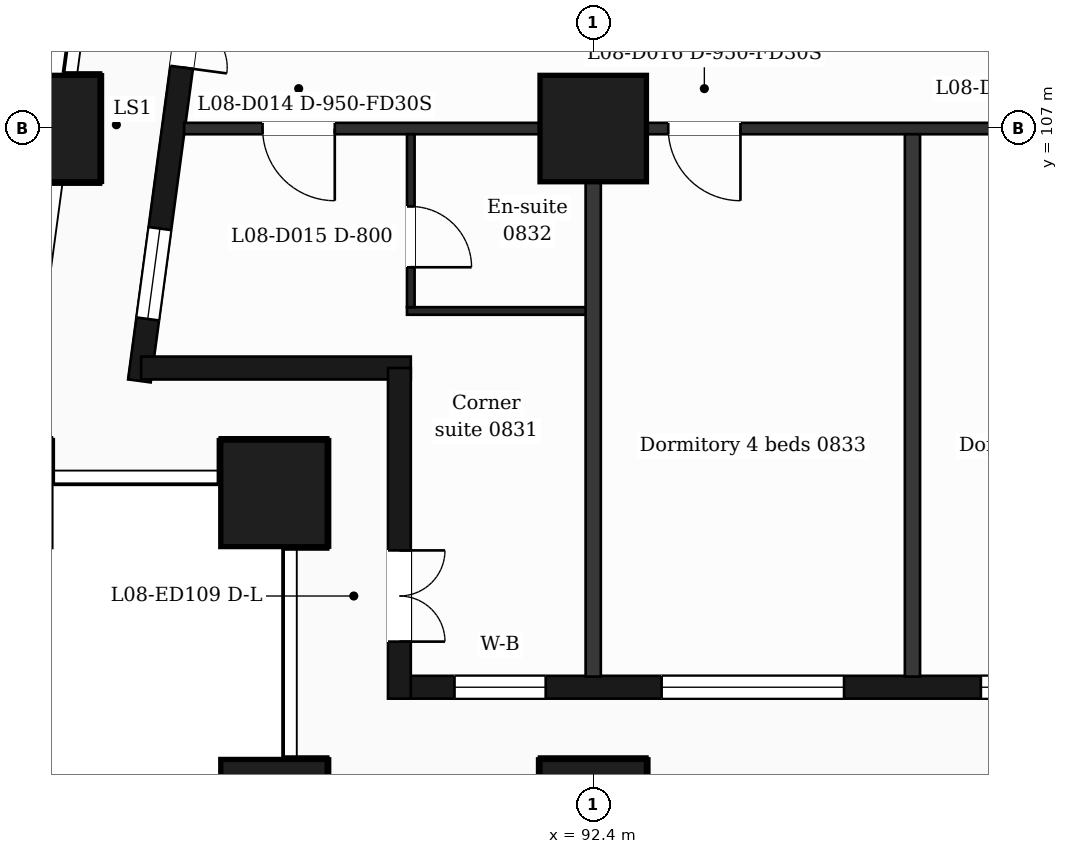
"""IFC4 building model, lengths in metres.
Left out: names, types, materials, properties, quantities, classifications, styles, units other than length and angle.
Written with IfcOpenShell. Run it as: python <this file> out.ifc"""

import sys

from ifc_helpers import new_model, si_unit, direction, frame, frame_2d, origin, origin_2d, place, context, subcontext, project, spatial, rectangle, extrude, element, fill, save


model = new_model("IFC4")
c1 = context("Model", 3, precision=1e-05, world=origin(), true_north=direction((0.0, 1.0)))
c2 = subcontext(c1, "Body", "Model", "MODEL_VIEW")
j1 = project(units=[si_unit("LENGTHUNIT", "METRE"), si_unit("PLANEANGLEUNIT", "RADIAN")], contexts=[c1])
p1 = place(None, origin())
s1 = spatial("IfcSite", under=j1, at=p1, CompositionType="ELEMENT")
p2 = place(p1, origin())
s2 = spatial("IfcBuilding", under=s1, at=p2, CompositionType="ELEMENT")
p3 = place(p2, frame((0.0, 0.0, 46.0)))
s3 = spatial("IfcBuildingStorey", under=s2, at=p3, CompositionType="ELEMENT", Elevation=46.0)
for number, where, z_axis, x_axis in (
    (1, (92.4, 98.0, 0.0), (0.0, 0.0, 1.0), (1.0, 0.0, 0.0)),
    (2, (88.2, 98.0, 0.0), (0.0, 0.0, 1.0), (1.0, 0.0, 0.0)),
    (3, (88.2, 102.2, 0.0), (0.0, 0.0, 1.0), (1.0, 0.0, 0.0)),
    (4, (92.4, 107.0, 0.0), (0.0, 0.0, 1.0), (1.0, 0.0, 0.0)),
    (5, (85.211, 107.0, 0.0), (0.0, 0.0, 1.0), (1.0, 0.0, 0.0)),
):
    element("IfcColumn", number, at=place(p3, frame(where, z_axis=z_axis, x_axis=x_axis)), inside=s3, PredefinedType="COLUMN", context=c2, shape_type="SweptSolid", body=[
        extrude(rectangle(XDim=1.4, YDim=1.4, at=origin_2d()), origin(), (0.0, 0.0, 1.0), 3.5),
    ])
p4 = place(p3, frame((89.85, 99.65, 0.0), z_axis=(0.0, 0.0, 1.0), x_axis=(1.0, 0.0, 0.0)))
e6 = element("IfcWall", 6, at=p4, inside=s3, PredefinedType="SOLIDWALL", context=c2, shape_type="SweptSolid", body=[
    extrude(rectangle(XDim=47.25, YDim=0.3, at=frame_2d((23.625, 0.0))), origin(), (0.0, 0.0, 1.0), 3.18),
])
p5 = place(p4, frame((0.725, 0.0, 0.9)))
e7 = element("IfcOpeningElement", 7, at=p5, cuts=e6, PredefinedType="OPENING", context=c2, shape_type="SweptSolid", body=[
    extrude(rectangle(XDim=1.2, YDim=2.1, at=frame_2d((0.6, 1.05))), frame((0.0, 0.16, 0.0), z_axis=(0.0, -1.0, 0.0), x_axis=(1.0, 0.0, 0.0)), (0.0, 0.0, 1.0), 0.32),
])
p6 = place(p4, frame((3.45, 0.0, 0.9)))
e8 = element("IfcOpeningElement", 8, at=p6, cuts=e6, PredefinedType="OPENING", context=c2, shape_type="SweptSolid", body=[
    extrude(rectangle(XDim=2.4, YDim=2.1, at=frame_2d((1.2, 1.05))), frame((0.0, 0.16, 0.0), z_axis=(0.0, -1.0, 0.0), x_axis=(1.0, 0.0, 0.0)), (0.0, 0.0, 1.0), 0.32),
])
p7 = place(p4, frame((7.65, 0.0, 0.9)))
e9 = element("IfcOpeningElement", 9, at=p7, cuts=e6, PredefinedType="OPENING", context=c2, shape_type="SweptSolid", body=[
    extrude(rectangle(XDim=2.4, YDim=2.1, at=frame_2d((1.2, 1.05))), frame((0.0, 0.16, 0.0), z_axis=(0.0, -1.0, 0.0), x_axis=(1.0, 0.0, 0.0)), (0.0, 0.0, 1.0), 0.32),
])
p8 = place(p4, frame((12.45, 0.0, 0.9)))
e10 = element("IfcOpeningElement", 10, at=p8, cuts=e6, PredefinedType="OPENING", context=c2, shape_type="SweptSolid", body=[
    extrude(rectangle(XDim=1.2, YDim=2.1, at=frame_2d((0.6, 1.05))), frame((0.0, 0.16, 0.0), z_axis=(0.0, -1.0, 0.0), x_axis=(1.0, 0.0, 0.0)), (0.0, 0.0, 1.0), 0.32),
])
p9 = place(p4, frame((16.65, 0.0, 0.9)))
e11 = element("IfcOpeningElement", 11, at=p9, cuts=e6, PredefinedType="OPENING", context=c2, shape_type="SweptSolid", body=[
    extrude(rectangle(XDim=1.2, YDim=2.1, at=frame_2d((0.6, 1.05))), frame((0.0, 0.16, 0.0), z_axis=(0.0, -1.0, 0.0), x_axis=(1.0, 0.0, 0.0)), (0.0, 0.0, 1.0), 0.32),
])
p10 = place(p4, frame((19.95, 0.0, 0.9)))
e12 = element("IfcOpeningElement", 12, at=p10, cuts=e6, PredefinedType="OPENING", context=c2, shape_type="SweptSolid", body=[
    extrude(rectangle(XDim=1.2, YDim=2.1, at=frame_2d((0.6, 1.05))), frame((0.0, 0.16, 0.0), z_axis=(0.0, -1.0, 0.0), x_axis=(1.0, 0.0, 0.0)), (0.0, 0.0, 1.0), 0.32),
])
p11 = place(p4, frame((21.75, 0.0, 0.9)))
e13 = element("IfcOpeningElement", 13, at=p11, cuts=e6, PredefinedType="OPENING", context=c2, shape_type="SweptSolid", body=[
    extrude(rectangle(XDim=1.2, YDim=2.1, at=frame_2d((0.6, 1.05))), frame((0.0, 0.16, 0.0), z_axis=(0.0, -1.0, 0.0), x_axis=(1.0, 0.0, 0.0)), (0.0, 0.0, 1.0), 0.32),
])
p12 = place(p4, frame((25.05, 0.0, 0.0)))
e14 = element("IfcOpeningElement", 14, at=p12, cuts=e6, PredefinedType="OPENING", context=c2, shape_type="SweptSolid", body=[
    extrude(rectangle(XDim=1.2, YDim=2.4, at=frame_2d((0.6, 1.2))), frame((0.0, 0.16, 0.0), z_axis=(0.0, -1.0, 0.0), x_axis=(1.0, 0.0, 0.0)), (0.0, 0.0, 1.0), 0.32),
])
p13 = place(p4, frame((28.35, 0.0, 0.9)))
e15 = element("IfcOpeningElement", 15, at=p13, cuts=e6, PredefinedType="OPENING", context=c2, shape_type="SweptSolid", body=[
    extrude(rectangle(XDim=1.2, YDim=2.1, at=frame_2d((0.6, 1.05))), frame((0.0, 0.16, 0.0), z_axis=(0.0, -1.0, 0.0), x_axis=(1.0, 0.0, 0.0)), (0.0, 0.0, 1.0), 0.32),
])
p14 = place(p4, frame((30.15, 0.0, 0.9)))
e16 = element("IfcOpeningElement", 16, at=p14, cuts=e6, PredefinedType="OPENING", context=c2, shape_type="SweptSolid", body=[
    extrude(rectangle(XDim=1.2, YDim=2.1, at=frame_2d((0.6, 1.05))), frame((0.0, 0.16, 0.0), z_axis=(0.0, -1.0, 0.0), x_axis=(1.0, 0.0, 0.0)), (0.0, 0.0, 1.0), 0.32),
])
p15 = place(p4, frame((32.85, 0.0, 0.9)))
e17 = element("IfcOpeningElement", 17, at=p15, cuts=e6, PredefinedType="OPENING", context=c2, shape_type="SweptSolid", body=[
    extrude(rectangle(XDim=2.4, YDim=2.1, at=frame_2d((1.2, 1.05))), frame((0.0, 0.16, 0.0), z_axis=(0.0, -1.0, 0.0), x_axis=(1.0, 0.0, 0.0)), (0.0, 0.0, 1.0), 0.32),
])
p16 = place(p4, frame((37.05, 0.0, 0.9)))
e18 = element("IfcOpeningElement", 18, at=p16, cuts=e6, PredefinedType="OPENING", context=c2, shape_type="SweptSolid", body=[
    extrude(rectangle(XDim=2.4, YDim=2.1, at=frame_2d((1.2, 1.05))), frame((0.0, 0.16, 0.0), z_axis=(0.0, -1.0, 0.0), x_axis=(1.0, 0.0, 0.0)), (0.0, 0.0, 1.0), 0.32),
])
p17 = place(p4, frame((41.85, 0.0, 0.9)))
e19 = element("IfcOpeningElement", 19, at=p17, cuts=e6, PredefinedType="OPENING", context=c2, shape_type="SweptSolid", body=[
    extrude(rectangle(XDim=1.2, YDim=2.1, at=frame_2d((0.6, 1.05))), frame((0.0, 0.16, 0.0), z_axis=(0.0, -1.0, 0.0), x_axis=(1.0, 0.0, 0.0)), (0.0, 0.0, 1.0), 0.32),
])
p18 = place(p4, frame((45.25, 0.0, 0.9)))
e20 = element("IfcOpeningElement", 20, at=p18, cuts=e6, PredefinedType="OPENING", context=c2, shape_type="SweptSolid", body=[
    extrude(rectangle(XDim=1.2, YDim=2.1, at=frame_2d((0.6, 1.05))), frame((0.0, 0.16, 0.0), z_axis=(0.0, -1.0, 0.0), x_axis=(1.0, 0.0, 0.0)), (0.0, 0.0, 1.0), 0.32),
])
p19 = place(p3, frame((87.334, 110.4, 0.0), z_axis=(0.0, 0.0, 1.0), x_axis=(-0.133437175554, -0.991057273915, 0.0)))
e21 = element("IfcWall", 21, at=p19, inside=s3, PredefinedType="SOLIDWALL", context=c2, shape_type="SweptSolid", body=[
    extrude(rectangle(XDim=6.781, YDim=0.3, at=frame_2d((3.39, 0.0))), origin(), (0.0, 0.0, 1.0), 3.18),
])
p20 = place(p19, frame((1.418, 0.0, 0.0)))
e22 = element("IfcOpeningElement", 22, at=p20, cuts=e21, PredefinedType="OPENING", context=c2, shape_type="SweptSolid", body=[
    extrude(rectangle(XDim=1.2, YDim=2.4, at=frame_2d((0.6, 1.2))), frame((0.0, 0.16, 0.0), z_axis=(0.0, -1.0, 0.0), x_axis=(1.0, 0.0, 0.0)), (0.0, 0.0, 1.0), 0.32),
])
p21 = place(p19, frame((4.758, 0.0, 0.9)))
e23 = element("IfcOpeningElement", 23, at=p21, cuts=e21, PredefinedType="OPENING", context=c2, shape_type="SweptSolid", body=[
    extrude(rectangle(XDim=1.2, YDim=2.1, at=frame_2d((0.6, 1.05))), frame((0.0, 0.16, 0.0), z_axis=(0.0, -1.0, 0.0), x_axis=(1.0, 0.0, 0.0)), (0.0, 0.0, 1.0), 0.32),
])
p22 = place(p3, frame((86.452, 103.85, 0.0), z_axis=(0.0, 0.0, 1.0), x_axis=(1.0, 0.0, 0.0)))
e24 = element("IfcWall", 24, at=p22, inside=s3, PredefinedType="SOLIDWALL", context=c2, shape_type="SweptSolid", body=[
    extrude(rectangle(XDim=3.548, YDim=0.3, at=frame_2d((1.774, 0.0))), origin(), (0.0, 0.0, 1.0), 3.18),
])
p23 = place(p3, frame((89.85, 103.85, 0.0), z_axis=(0.0, 0.0, 1.0), x_axis=(0.0, -1.0, 0.0)))
e25 = element("IfcWall", 25, at=p23, inside=s3, PredefinedType="SOLIDWALL", context=c2, shape_type="SweptSolid", body=[
    extrude(rectangle(XDim=4.35, YDim=0.3, at=frame_2d((2.175, 0.0))), origin(), (0.0, 0.0, 1.0), 3.18),
])
p24 = place(p23, frame((2.4, 0.0, 0.0)))
e26 = element("IfcOpeningElement", 26, at=p24, cuts=e25, PredefinedType="OPENING", context=c2, shape_type="SweptSolid", body=[
    extrude(rectangle(XDim=1.2, YDim=2.4, at=frame_2d((0.6, 1.2))), frame((0.0, 0.16, 0.0), z_axis=(0.0, -1.0, 0.0), x_axis=(1.0, 0.0, 0.0)), (0.0, 0.0, 1.0), 0.32),
])
p25 = place(p3, frame((89.95, 104.6, 0.0), z_axis=(0.0, 0.0, 1.0), x_axis=(1.0, 0.0, 0.0)))
e27 = element("IfcWall", 27, at=p25, inside=s3, PredefinedType="PARTITIONING", context=c2, shape_type="SweptSolid", body=[
    extrude(rectangle(XDim=2.45, YDim=0.1, at=frame_2d((1.225, 0.0))), origin(), (0.0, 0.0, 1.0), 3.18),
])
p26 = place(p3, frame((87.018, 107.0, 0.0), z_axis=(0.0, 0.0, 1.0), x_axis=(1.0, 0.0, 0.0)))
e28 = element("IfcWall", 28, at=p26, inside=s3, PredefinedType="PARTITIONING", context=c2, shape_type="SweptSolid", body=[
    extrude(rectangle(XDim=52.765, YDim=0.15, at=frame_2d((26.382, 0.0))), origin(), (0.0, 0.0, 1.0), 3.18),
])
p27 = place(p26, frame((1.032, 0.0, 0.0)))
e29 = element("IfcOpeningElement", 29, at=p27, cuts=e28, PredefinedType="OPENING", context=c2, shape_type="SweptSolid", body=[
    extrude(rectangle(XDim=0.95, YDim=2.1, at=frame_2d((0.475, 1.05))), frame((0.0, 0.085, 0.0), z_axis=(0.0, -1.0, 0.0), x_axis=(1.0, 0.0, 0.0)), (0.0, 0.0, 1.0), 0.17),
])
p28 = place(p26, frame((6.369, 0.0, 0.0)))
e30 = element("IfcOpeningElement", 30, at=p28, cuts=e28, PredefinedType="OPENING", context=c2, shape_type="SweptSolid", body=[
    extrude(rectangle(XDim=0.95, YDim=2.1, at=frame_2d((0.475, 1.05))), frame((0.0, 0.085, 0.0), z_axis=(0.0, -1.0, 0.0), x_axis=(1.0, 0.0, 0.0)), (0.0, 0.0, 1.0), 0.17),
])
p29 = place(p26, frame((10.952, 0.0, 0.0)))
e31 = element("IfcOpeningElement", 31, at=p29, cuts=e28, PredefinedType="OPENING", context=c2, shape_type="SweptSolid", body=[
    extrude(rectangle(XDim=0.95, YDim=2.1, at=frame_2d((0.475, 1.05))), frame((0.0, 0.085, 0.0), z_axis=(0.0, -1.0, 0.0), x_axis=(1.0, 0.0, 0.0)), (0.0, 0.0, 1.0), 0.17),
])
p30 = place(p26, frame((16.045, 0.0, 0.0)))
e32 = element("IfcOpeningElement", 32, at=p30, cuts=e28, PredefinedType="OPENING", context=c2, shape_type="SweptSolid", body=[
    extrude(rectangle(XDim=0.95, YDim=2.1, at=frame_2d((0.475, 1.05))), frame((0.0, 0.085, 0.0), z_axis=(0.0, -1.0, 0.0), x_axis=(1.0, 0.0, 0.0)), (0.0, 0.0, 1.0), 0.17),
])
p31 = place(p26, frame((20.245, 0.0, 0.0)))
e33 = element("IfcOpeningElement", 33, at=p31, cuts=e28, PredefinedType="OPENING", context=c2, shape_type="SweptSolid", body=[
    extrude(rectangle(XDim=0.95, YDim=2.1, at=frame_2d((0.475, 1.05))), frame((0.0, 0.085, 0.0), z_axis=(0.0, -1.0, 0.0), x_axis=(1.0, 0.0, 0.0)), (0.0, 0.0, 1.0), 0.17),
])
p32 = place(p26, frame((24.969, 0.0, 0.0)))
e34 = element("IfcOpeningElement", 34, at=p32, cuts=e28, PredefinedType="OPENING", context=c2, shape_type="SweptSolid", body=[
    extrude(rectangle(XDim=0.95, YDim=2.1, at=frame_2d((0.475, 1.05))), frame((0.0, 0.085, 0.0), z_axis=(0.0, -1.0, 0.0), x_axis=(1.0, 0.0, 0.0)), (0.0, 0.0, 1.0), 0.17),
])
p33 = place(p26, frame((26.807, 0.0, 0.0)))
e35 = element("IfcOpeningElement", 35, at=p33, cuts=e28, PredefinedType="OPENING", context=c2, shape_type="SweptSolid", body=[
    extrude(rectangle(XDim=0.95, YDim=2.1, at=frame_2d((0.475, 1.05))), frame((0.0, 0.085, 0.0), z_axis=(0.0, -1.0, 0.0), x_axis=(1.0, 0.0, 0.0)), (0.0, 0.0, 1.0), 0.17),
])
p34 = place(p26, frame((31.952, 0.0, 0.0)))
e36 = element("IfcOpeningElement", 36, at=p34, cuts=e28, PredefinedType="OPENING", context=c2, shape_type="SweptSolid", body=[
    extrude(rectangle(XDim=0.95, YDim=2.1, at=frame_2d((0.475, 1.05))), frame((0.0, 0.085, 0.0), z_axis=(0.0, -1.0, 0.0), x_axis=(1.0, 0.0, 0.0)), (0.0, 0.0, 1.0), 0.17),
])
p35 = place(p26, frame((40.795, 0.0, 0.0)))
e37 = element("IfcOpeningElement", 37, at=p35, cuts=e28, PredefinedType="OPENING", context=c2, shape_type="SweptSolid", body=[
    extrude(rectangle(XDim=0.95, YDim=2.1, at=frame_2d((0.475, 1.05))), frame((0.0, 0.085, 0.0), z_axis=(0.0, -1.0, 0.0), x_axis=(1.0, 0.0, 0.0)), (0.0, 0.0, 1.0), 0.17),
])
p36 = place(p26, frame((43.644, 0.0, 0.0)))
e38 = element("IfcOpeningElement", 38, at=p36, cuts=e28, PredefinedType="OPENING", context=c2, shape_type="SweptSolid", body=[
    extrude(rectangle(XDim=0.95, YDim=2.1, at=frame_2d((0.475, 1.05))), frame((0.0, 0.085, 0.0), z_axis=(0.0, -1.0, 0.0), x_axis=(1.0, 0.0, 0.0)), (0.0, 0.0, 1.0), 0.17),
])
p37 = place(p26, frame((48.767, 0.0, 0.0)))
e39 = element("IfcOpeningElement", 39, at=p37, cuts=e28, PredefinedType="OPENING", context=c2, shape_type="SweptSolid", body=[
    extrude(rectangle(XDim=0.95, YDim=2.1, at=frame_2d((0.475, 1.05))), frame((0.0, 0.085, 0.0), z_axis=(0.0, -1.0, 0.0), x_axis=(1.0, 0.0, 0.0)), (0.0, 0.0, 1.0), 0.17),
])
p38 = place(p3, frame((90.0, 104.65, 0.0), z_axis=(0.0, 0.0, 1.0), x_axis=(0.0, 1.0, 0.0)))
e40 = element("IfcWall", 40, at=p38, inside=s3, PredefinedType="PARTITIONING", context=c2, shape_type="SweptSolid", body=[
    extrude(rectangle(XDim=2.275, YDim=0.1, at=frame_2d((1.138, 0.0))), origin(), (0.0, 0.0, 1.0), 3.18),
])
p39 = place(p38, frame((0.525, 0.0, 0.0)))
e41 = element("IfcOpeningElement", 41, at=p39, cuts=e40, PredefinedType="OPENING", context=c2, shape_type="SweptSolid", body=[
    extrude(rectangle(XDim=0.8, YDim=2.1, at=frame_2d((0.4, 1.05))), frame((0.0, 0.06, 0.0), z_axis=(0.0, -1.0, 0.0), x_axis=(1.0, 0.0, 0.0)), (0.0, 0.0, 1.0), 0.12),
])
for number, where, z_axis, x_axis in (
    (42, (92.4, 99.79, 0.0), (0.0, 0.0, 1.0), (0.0, 1.0, 0.0)),
    (43, (96.6, 99.79, 0.0), (0.0, 0.0, 1.0), (0.0, 1.0, 0.0)),
):
    element("IfcWall", number, at=place(p3, frame(where, z_axis=z_axis, x_axis=x_axis)), inside=s3, PredefinedType="PARTITIONING", context=c2, shape_type="SweptSolid", body=[
        extrude(rectangle(XDim=7.135, YDim=0.2, at=frame_2d((3.567, 0.0))), origin(), (0.0, 0.0, 1.0), 3.18),
    ])
p40 = place(p5, origin())
e44 = element("IfcWindow", 44, at=p40, inside=s3, PartitioningType="SINGLE_PANEL", PredefinedType="WINDOW", context=c2, shape_type="SweptSolid", body=[
    extrude(rectangle(XDim=1.2, YDim=2.1, at=frame_2d((0.6, 1.05))), frame((0.0, 0.03, 0.0), z_axis=(0.0, -1.0, 0.0), x_axis=(1.0, 0.0, 0.0)), (0.0, 0.0, 1.0), 0.06),
])
fill(e7, e44)
p41 = place(p6, origin())
e45 = element("IfcWindow", 45, at=p41, inside=s3, PartitioningType="SINGLE_PANEL", PredefinedType="WINDOW", context=c2, shape_type="SweptSolid", body=[
    extrude(rectangle(XDim=2.4, YDim=2.1, at=frame_2d((1.2, 1.05))), frame((0.0, 0.03, 0.0), z_axis=(0.0, -1.0, 0.0), x_axis=(1.0, 0.0, 0.0)), (0.0, 0.0, 1.0), 0.06),
])
fill(e8, e45)
p42 = place(p7, origin())
e46 = element("IfcWindow", 46, at=p42, inside=s3, PartitioningType="SINGLE_PANEL", PredefinedType="WINDOW", context=c2, shape_type="SweptSolid", body=[
    extrude(rectangle(XDim=2.4, YDim=2.1, at=frame_2d((1.2, 1.05))), frame((0.0, 0.03, 0.0), z_axis=(0.0, -1.0, 0.0), x_axis=(1.0, 0.0, 0.0)), (0.0, 0.0, 1.0), 0.06),
])
fill(e9, e46)
p43 = place(p20, origin())
e47 = element("IfcDoor", 47, at=p43, inside=s3, OperationType="DOUBLE_DOOR_SINGLE_SWING", PredefinedType="DOOR", context=c2, shape_type="SweptSolid", body=[
    extrude(rectangle(XDim=1.2, YDim=2.4, at=frame_2d((0.6, 1.2))), frame((0.0, 0.025, 0.0), z_axis=(0.0, -1.0, 0.0), x_axis=(1.0, 0.0, 0.0)), (0.0, 0.0, 1.0), 0.05),
])
fill(e22, e47)
p44 = place(p21, origin())
e48 = element("IfcWindow", 48, at=p44, inside=s3, PartitioningType="SINGLE_PANEL", PredefinedType="WINDOW", context=c2, shape_type="SweptSolid", body=[
    extrude(rectangle(XDim=1.2, YDim=2.1, at=frame_2d((0.6, 1.05))), frame((0.0, 0.03, 0.0), z_axis=(0.0, -1.0, 0.0), x_axis=(1.0, 0.0, 0.0)), (0.0, 0.0, 1.0), 0.06),
])
fill(e23, e48)
p45 = place(p24, origin())
e49 = element("IfcDoor", 49, at=p45, inside=s3, OperationType="DOUBLE_DOOR_SINGLE_SWING", PredefinedType="DOOR", context=c2, shape_type="SweptSolid", body=[
    extrude(rectangle(XDim=1.2, YDim=2.4, at=frame_2d((0.6, 1.2))), frame((0.0, 0.025, 0.0), z_axis=(0.0, -1.0, 0.0), x_axis=(1.0, 0.0, 0.0)), (0.0, 0.0, 1.0), 0.05),
])
fill(e26, e49)
p46 = place(p27, origin())
e50 = element("IfcDoor", 50, at=p46, inside=s3, OperationType="SINGLE_SWING_RIGHT", PredefinedType="DOOR", context=c2, shape_type="SweptSolid", body=[
    extrude(rectangle(XDim=0.95, YDim=2.1, at=frame_2d((0.475, 1.05))), frame((0.0, 0.025, 0.0), z_axis=(0.0, -1.0, 0.0), x_axis=(1.0, 0.0, 0.0)), (0.0, 0.0, 1.0), 0.05),
])
fill(e29, e50)
p47 = place(p39, origin())
e51 = element("IfcDoor", 51, at=p47, inside=s3, OperationType="SINGLE_SWING_LEFT", PredefinedType="DOOR", context=c2, shape_type="SweptSolid", body=[
    extrude(rectangle(XDim=0.8, YDim=2.1, at=frame_2d((0.4, 1.05))), frame((0.0, 0.025, 0.0), z_axis=(0.0, -1.0, 0.0), x_axis=(1.0, 0.0, 0.0)), (0.0, 0.0, 1.0), 0.05),
])
fill(e41, e51)
p48 = place(p28, origin())
e52 = element("IfcDoor", 52, at=p48, inside=s3, OperationType="SINGLE_SWING_RIGHT", PredefinedType="DOOR", context=c2, shape_type="SweptSolid", body=[
    extrude(rectangle(XDim=0.95, YDim=2.1, at=frame_2d((0.475, 1.05))), frame((0.0, 0.025, 0.0), z_axis=(0.0, -1.0, 0.0), x_axis=(1.0, 0.0, 0.0)), (0.0, 0.0, 1.0), 0.05),
])
fill(e30, e52)
save(model, sys.argv[1])
